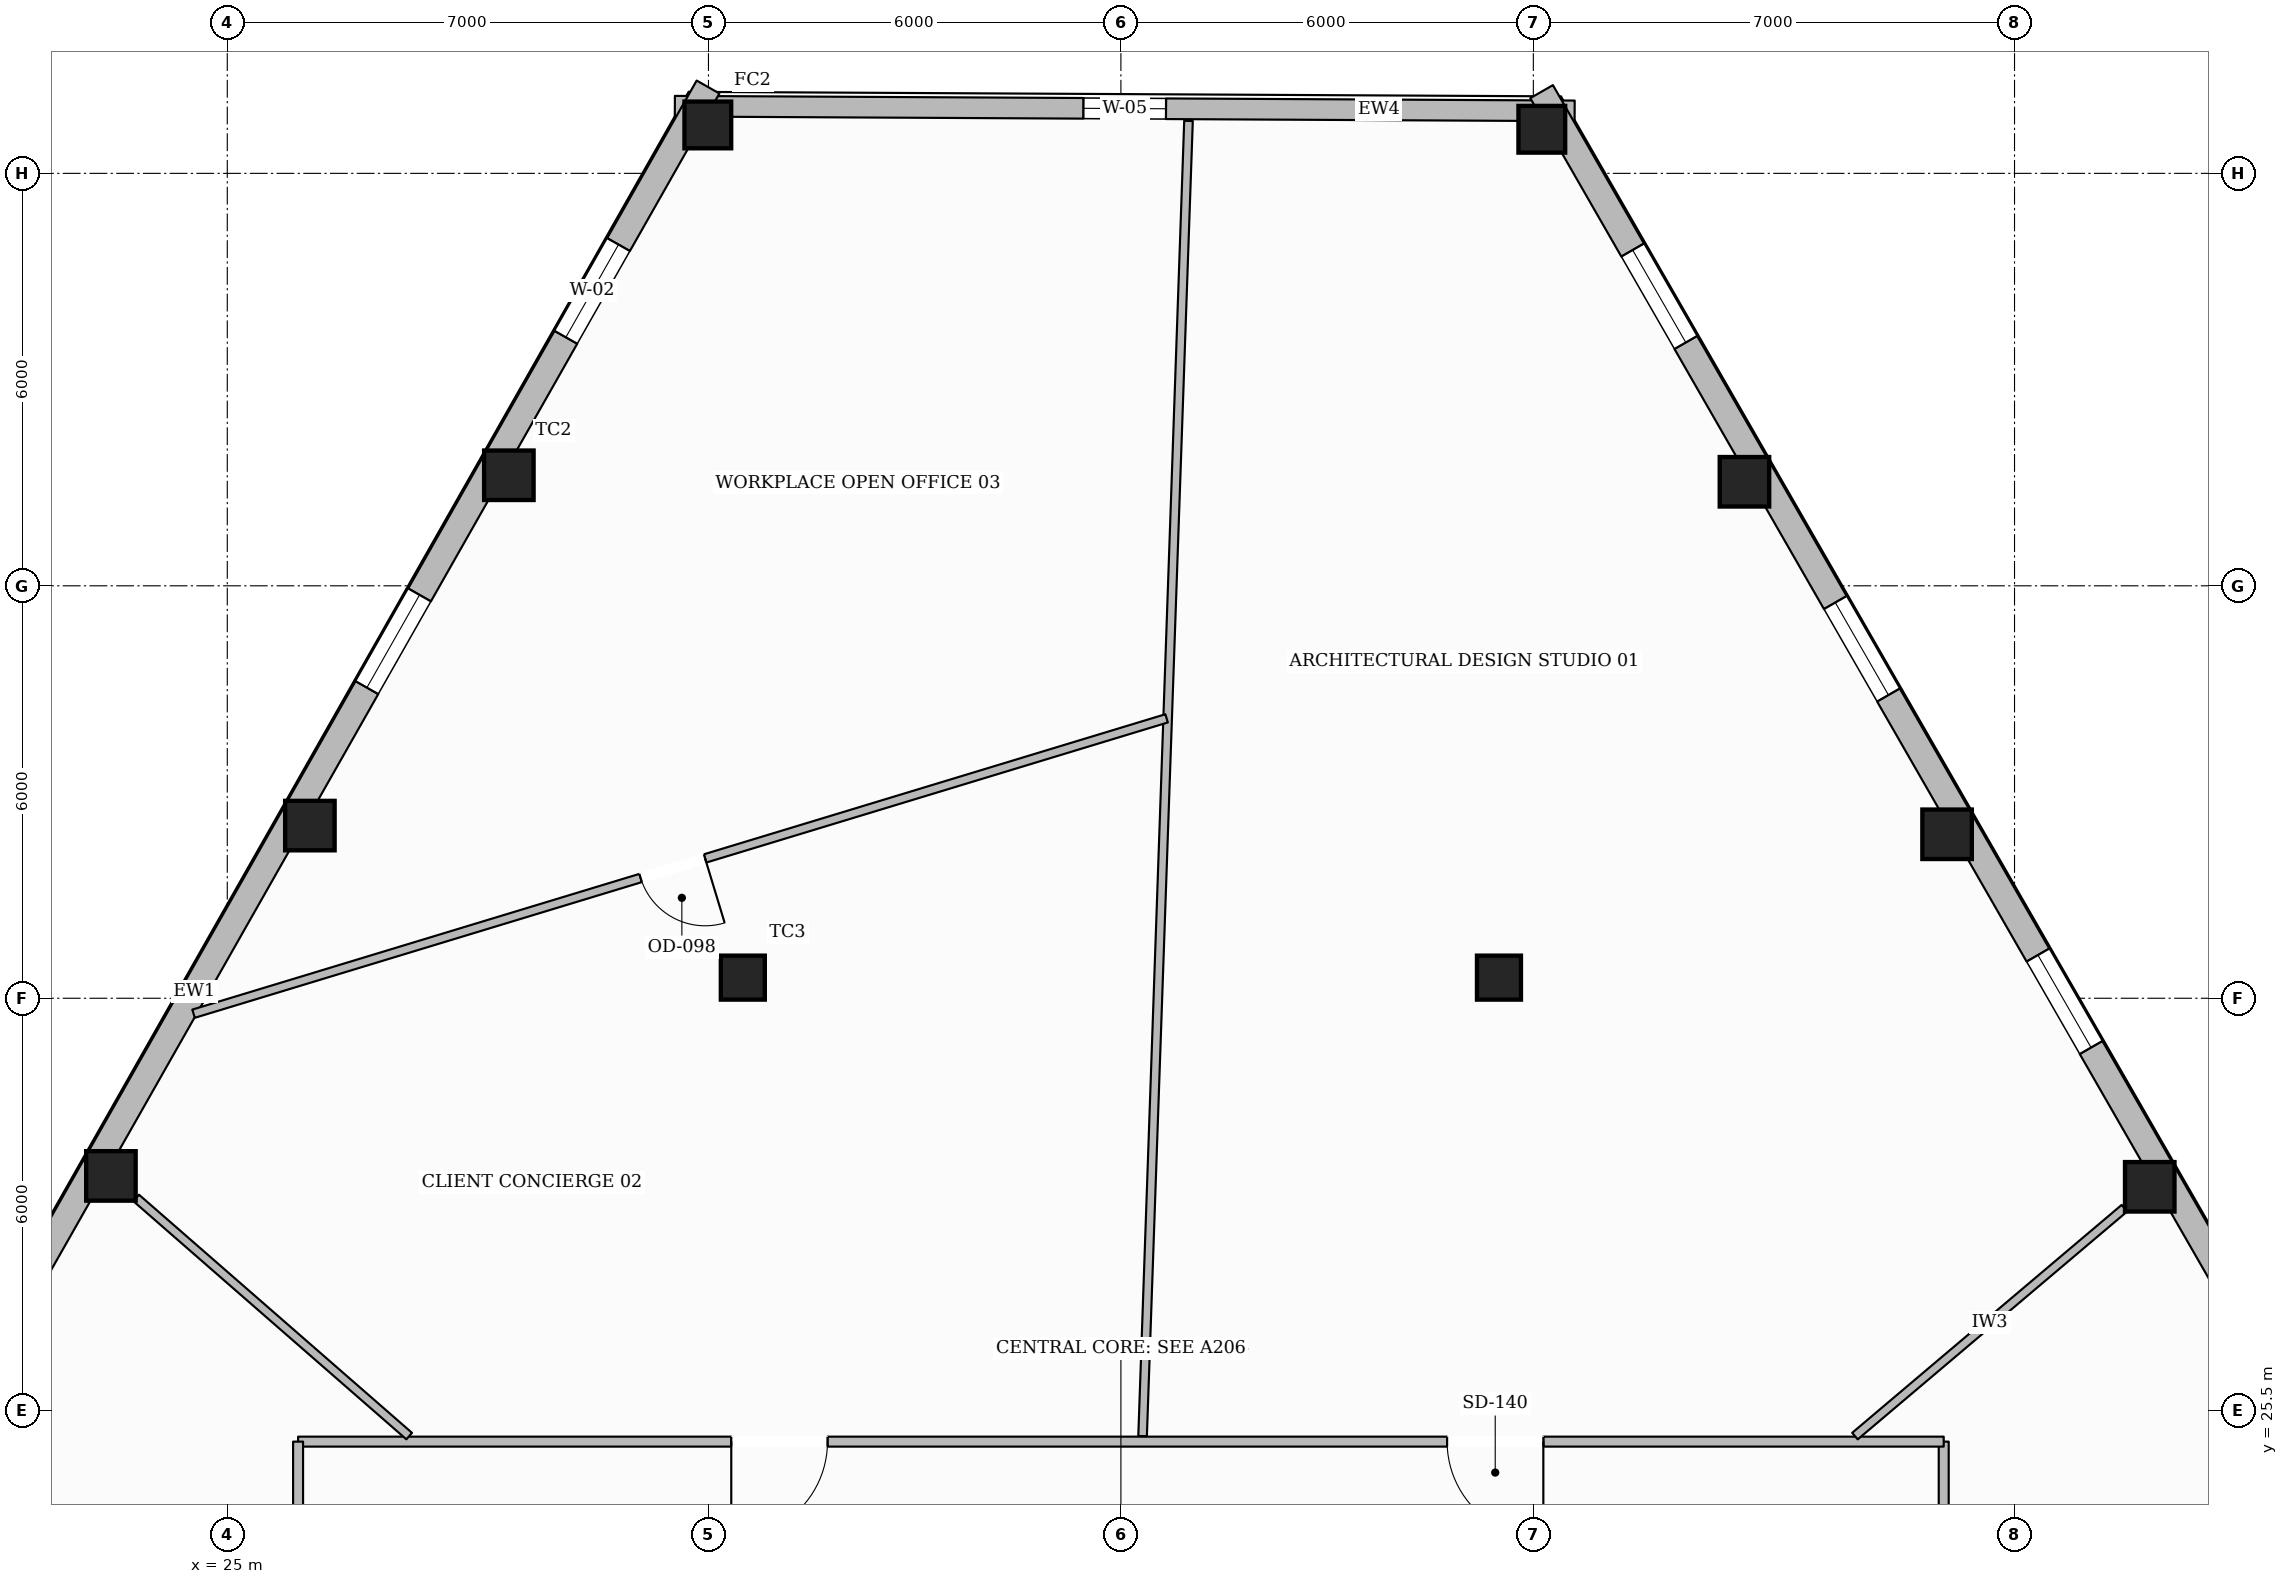
"""IFC4 building model, lengths in metres.
Left out: names, types, materials, properties, quantities, classifications, styles, units other than length and angle.
Written with IfcOpenShell. Run it as: python <this file> out.ifc"""

import sys

from ifc_helpers import new_model, si_unit, direction, frame, frame_2d, origin, origin_2d, place, context, subcontext, project, spatial, rectangle, hollow_rectangle, extrude, element, fill, save


model = new_model("IFC4")
c1 = context("Model", 3, precision=1e-05, world=origin(), true_north=direction((0.0, 1.0)))
c2 = subcontext(c1, "Body", "Model", "MODEL_VIEW")
j1 = project(units=[si_unit("LENGTHUNIT", "METRE"), si_unit("PLANEANGLEUNIT", "RADIAN")], contexts=[c1])
p1 = place(None, origin())
s1 = spatial("IfcSite", under=j1, at=p1, CompositionType="ELEMENT")
p2 = place(p1, origin())
s2 = spatial("IfcBuilding", under=s1, at=p2, CompositionType="ELEMENT")
p3 = place(p2, frame((0.0, 0.0, 100.9)))
s3 = spatial("IfcBuildingStorey", under=s2, at=p3, CompositionType="ELEMENT", Elevation=100.9)
p4 = place(p3, frame((31.991, 44.204, 0.0), z_axis=(0.0, 0.0, 1.0), x_axis=(1.0, 0.0, 0.0)))
e1 = element("IfcColumn", 1, at=p4, inside=s3, PredefinedType="COLUMN", context=c2, shape_type="SweptSolid", body=[
    extrude(hollow_rectangle(XDim=0.68, YDim=0.68, WallThickness=0.03, at=origin_2d()), origin(), (0.0, 0.0, 1.0), 3.6),
])
for number, where, z_axis, x_axis in (
    (2, (29.096, 39.108, 0.0), (0.0, 0.0, 1.0), (1.0, 0.0, 0.0)),
    (3, (26.202, 34.012, 0.0), (0.0, 0.0, 1.0), (1.0, 0.0, 0.0)),
    (4, (23.307, 28.915, 0.0), (0.0, 0.0, 1.0), (1.0, 0.0, 0.0)),
    (5, (52.967, 28.757, 0.0), (0.0, 0.0, 1.0), (1.0, 0.0, 0.0)),
    (6, (50.019, 33.885, 0.0), (0.0, 0.0, 1.0), (1.0, 0.0, 0.0)),
    (7, (47.071, 39.013, 0.0), (0.0, 0.0, 1.0), (1.0, 0.0, 0.0)),
):
    element("IfcColumn", number, at=place(p3, frame(where, z_axis=z_axis, x_axis=x_axis)), inside=s3, PredefinedType="COLUMN", context=c2, shape_type="SweptSolid", body=[
        extrude(hollow_rectangle(XDim=0.72, YDim=0.72, WallThickness=0.032, at=origin_2d()), origin(), (0.0, 0.0, 1.0), 3.6),
    ])
p5 = place(p3, frame((44.123, 44.142, 0.0), z_axis=(0.0, 0.0, 1.0), x_axis=(1.0, 0.0, 0.0)))
e8 = element("IfcColumn", 8, at=p5, inside=s3, PredefinedType="COLUMN", context=c2, shape_type="SweptSolid", body=[
    extrude(hollow_rectangle(XDim=0.68, YDim=0.68, WallThickness=0.03, at=origin_2d()), origin(), (0.0, 0.0, 1.0), 3.6),
])
for number, where, z_axis, x_axis in (
    (9, (32.5, 31.8, 0.0), (0.0, 0.0, 1.0), (1.0, 0.0, 0.0)),
    (10, (43.5, 31.8, 0.0), (0.0, 0.0, 1.0), (1.0, 0.0, 0.0)),
):
    element("IfcColumn", number, at=place(p3, frame(where, z_axis=z_axis, x_axis=x_axis)), inside=s3, PredefinedType="COLUMN", context=c2, shape_type="SweptSolid", body=[
        extrude(hollow_rectangle(XDim=0.64, YDim=0.64, WallThickness=0.028, at=origin_2d()), origin(), (0.0, 0.0, 1.0), 3.6),
    ])
p6 = place(p3, frame((31.511, 44.477, 0.0), z_axis=(0.0, 0.0, 1.0), x_axis=(0.999986654587, -0.005166299301, 0.0)))
e11 = element("IfcWall", 11, at=p6, inside=s3, PredefinedType="STANDARD", context=c2, shape_type="SweptSolid", body=[
    extrude(rectangle(XDim=13.09, YDim=0.3, at=frame_2d((6.545, 0.0))), origin(), (0.0, 0.0, 1.0), 3.059),
])
p7 = place(p6, frame((5.945, 0.0, 0.65)))
e12 = element("IfcOpeningElement", 12, at=p7, cuts=e11, PredefinedType="OPENING", context=c2, shape_type="SweptSolid", body=[
    extrude(rectangle(XDim=1.2, YDim=1.7, at=frame_2d((0.6, 0.85))), frame((0.0, 0.16, 0.0), z_axis=(0.0, -1.0, 0.0), x_axis=(1.0, 0.0, 0.0)), (0.0, 0.0, 1.0), 0.32),
])
p8 = place(p3, frame((14.155, 13.347, 0.0), z_axis=(0.0, 0.0, 1.0), x_axis=(0.493868426836, 0.869536644986, 0.0)))
e13 = element("IfcWall", 13, at=p8, inside=s3, PredefinedType="STANDARD", context=c2, shape_type="SweptSolid", body=[
    extrude(rectangle(XDim=36.121, YDim=0.38, at=frame_2d((18.061, 0.0))), origin(), (0.0, 0.0, 1.0), 3.059),
])
p9 = place(p8, frame((31.935, 0.0, 0.65)))
e14 = element("IfcOpeningElement", 14, at=p9, cuts=e13, PredefinedType="OPENING", context=c2, shape_type="SweptSolid", body=[
    extrude(rectangle(XDim=1.55, YDim=1.75, at=frame_2d((0.775, 0.875))), frame((0.0, 0.2, 0.0), z_axis=(0.0, -1.0, 0.0), x_axis=(1.0, 0.0, 0.0)), (0.0, 0.0, 1.0), 0.4),
])
p10 = place(p8, frame((26.073, 0.0, 0.65)))
e15 = element("IfcOpeningElement", 15, at=p10, cuts=e13, PredefinedType="OPENING", context=c2, shape_type="SweptSolid", body=[
    extrude(rectangle(XDim=1.55, YDim=1.75, at=frame_2d((0.775, 0.875))), frame((0.0, 0.2, 0.0), z_axis=(0.0, -1.0, 0.0), x_axis=(1.0, 0.0, 0.0)), (0.0, 0.0, 1.0), 0.4),
])
p11 = place(p8, frame((14.352, 0.0, 0.65)))
e16 = element("IfcOpeningElement", 16, at=p11, cuts=e13, PredefinedType="OPENING", context=c2, shape_type="SweptSolid", body=[
    extrude(rectangle(XDim=1.55, YDim=1.75, at=frame_2d((0.775, 0.875))), frame((0.0, 0.2, 0.0), z_axis=(0.0, -1.0, 0.0), x_axis=(1.0, 0.0, 0.0)), (0.0, 0.0, 1.0), 0.4),
])
p12 = place(p8, frame((8.491, 0.0, 0.65)))
e17 = element("IfcOpeningElement", 17, at=p12, cuts=e13, PredefinedType="OPENING", context=c2, shape_type="SweptSolid", body=[
    extrude(rectangle(XDim=1.55, YDim=1.75, at=frame_2d((0.775, 0.875))), frame((0.0, 0.2, 0.0), z_axis=(0.0, -1.0, 0.0), x_axis=(1.0, 0.0, 0.0)), (0.0, 0.0, 1.0), 0.4),
])
p13 = place(p8, frame((2.63, 0.0, 0.65)))
e18 = element("IfcOpeningElement", 18, at=p13, cuts=e13, PredefinedType="OPENING", context=c2, shape_type="SweptSolid", body=[
    extrude(rectangle(XDim=1.55, YDim=1.75, at=frame_2d((0.775, 0.875))), frame((0.0, 0.2, 0.0), z_axis=(0.0, -1.0, 0.0), x_axis=(1.0, 0.0, 0.0)), (0.0, 0.0, 1.0), 0.4),
])
p14 = place(p3, frame((44.12, 44.689, 0.0), z_axis=(0.0, 0.0, 1.0), x_axis=(0.498376840975, -0.866960509124, 0.0)))
e19 = element("IfcWall", 19, at=p14, inside=s3, PredefinedType="STANDARD", context=c2, shape_type="SweptSolid", body=[
    extrude(rectangle(XDim=36.441, YDim=0.38, at=frame_2d((18.22, 0.0))), origin(), (0.0, 0.0, 1.0), 3.059),
])
p15 = place(p14, frame((32.234, 0.0, 0.65)))
e20 = element("IfcOpeningElement", 20, at=p15, cuts=e19, PredefinedType="OPENING", context=c2, shape_type="SweptSolid", body=[
    extrude(rectangle(XDim=1.55, YDim=1.75, at=frame_2d((0.775, 0.875))), frame((0.0, 0.2, 0.0), z_axis=(0.0, -1.0, 0.0), x_axis=(1.0, 0.0, 0.0)), (0.0, 0.0, 1.0), 0.4),
])
p16 = place(p14, frame((26.319, 0.0, 0.65)))
e21 = element("IfcOpeningElement", 21, at=p16, cuts=e19, PredefinedType="OPENING", context=c2, shape_type="SweptSolid", body=[
    extrude(rectangle(XDim=1.55, YDim=1.75, at=frame_2d((0.775, 0.875))), frame((0.0, 0.2, 0.0), z_axis=(0.0, -1.0, 0.0), x_axis=(1.0, 0.0, 0.0)), (0.0, 0.0, 1.0), 0.4),
])
p17 = place(p14, frame((14.489, 0.0, 0.65)))
e22 = element("IfcOpeningElement", 22, at=p17, cuts=e19, PredefinedType="OPENING", context=c2, shape_type="SweptSolid", body=[
    extrude(rectangle(XDim=1.55, YDim=1.75, at=frame_2d((0.775, 0.875))), frame((0.0, 0.2, 0.0), z_axis=(0.0, -1.0, 0.0), x_axis=(1.0, 0.0, 0.0)), (0.0, 0.0, 1.0), 0.4),
])
p18 = place(p14, frame((8.573, 0.0, 0.65)))
e23 = element("IfcOpeningElement", 23, at=p18, cuts=e19, PredefinedType="OPENING", context=c2, shape_type="SweptSolid", body=[
    extrude(rectangle(XDim=1.55, YDim=1.75, at=frame_2d((0.775, 0.875))), frame((0.0, 0.2, 0.0), z_axis=(0.0, -1.0, 0.0), x_axis=(1.0, 0.0, 0.0)), (0.0, 0.0, 1.0), 0.4),
])
p19 = place(p14, frame((2.658, 0.0, 0.65)))
e24 = element("IfcOpeningElement", 24, at=p19, cuts=e19, PredefinedType="OPENING", context=c2, shape_type="SweptSolid", body=[
    extrude(rectangle(XDim=1.55, YDim=1.75, at=frame_2d((0.775, 0.875))), frame((0.0, 0.2, 0.0), z_axis=(0.0, -1.0, 0.0), x_axis=(1.0, 0.0, 0.0)), (0.0, 0.0, 1.0), 0.4),
])
p20 = place(p3, frame((49.97, 7.15, 0.0), z_axis=(0.0, 0.0, 1.0), x_axis=(0.0, 1.0, 0.0)))
e25 = element("IfcWall", 25, at=p20, inside=s3, PredefinedType="PARTITIONING", context=c2, shape_type="SweptSolid", body=[
    extrude(rectangle(XDim=17.9, YDim=0.145, at=frame_2d((8.95, 0.0))), origin(), (0.0, 0.0, 1.0), 3.288),
])
p21 = place(p20, frame((8.25, 0.0, 0.0)))
e26 = element("IfcOpeningElement", 26, at=p21, cuts=e25, PredefinedType="OPENING", context=c2, shape_type="SweptSolid", body=[
    extrude(rectangle(XDim=1.4, YDim=2.2, at=frame_2d((0.7, 1.1))), frame((0.0, 0.083, 0.0), z_axis=(0.0, -1.0, 0.0), x_axis=(1.0, 0.0, 0.0)), (0.0, 0.0, 1.0), 0.165),
])
p22 = place(p3, frame((49.97, 25.05, 0.0), z_axis=(0.0, 0.0, 1.0), x_axis=(-1.0, 0.0, 0.0)))
e27 = element("IfcWall", 27, at=p22, inside=s3, PredefinedType="PARTITIONING", context=c2, shape_type="SweptSolid", body=[
    extrude(rectangle(XDim=23.94, YDim=0.145, at=frame_2d((11.97, 0.0))), origin(), (0.0, 0.0, 1.0), 3.6),
])
p23 = place(p22, frame((5.824, 0.0, 0.0)))
e28 = element("IfcOpeningElement", 28, at=p23, cuts=e27, PredefinedType="OPENING", context=c2, shape_type="SweptSolid", body=[
    extrude(rectangle(XDim=1.4, YDim=2.2, at=frame_2d((0.7, 1.1))), frame((0.0, 0.083, 0.0), z_axis=(0.0, -1.0, 0.0), x_axis=(1.0, 0.0, 0.0)), (0.0, 0.0, 1.0), 0.165),
])
p24 = place(p22, frame((16.238, 0.0, 0.0)))
e29 = element("IfcOpeningElement", 29, at=p24, cuts=e27, PredefinedType="OPENING", context=c2, shape_type="SweptSolid", body=[
    extrude(rectangle(XDim=1.4, YDim=2.2, at=frame_2d((0.7, 1.1))), frame((0.0, 0.083, 0.0), z_axis=(0.0, -1.0, 0.0), x_axis=(1.0, 0.0, 0.0)), (0.0, 0.0, 1.0), 0.165),
])
p25 = place(p3, frame((26.03, 25.05, 0.0), z_axis=(0.0, 0.0, 1.0), x_axis=(0.0, -1.0, 0.0)))
e30 = element("IfcWall", 30, at=p25, inside=s3, PredefinedType="PARTITIONING", context=c2, shape_type="SweptSolid", body=[
    extrude(rectangle(XDim=17.9, YDim=0.145, at=frame_2d((8.95, 0.0))), origin(), (0.0, 0.0, 1.0), 3.288),
])
p26 = place(p25, frame((7.016, 0.0, 0.0)))
e31 = element("IfcOpeningElement", 31, at=p26, cuts=e30, PredefinedType="OPENING", context=c2, shape_type="SweptSolid", body=[
    extrude(rectangle(XDim=1.4, YDim=2.2, at=frame_2d((0.7, 1.1))), frame((0.0, 0.083, 0.0), z_axis=(0.0, -1.0, 0.0), x_axis=(1.0, 0.0, 0.0)), (0.0, 0.0, 1.0), 0.165),
])
p27 = place(p3, frame((48.679, 25.131, 0.0), z_axis=(0.0, 0.0, 1.0), x_axis=(0.763563012799, 0.645733323815, 0.0)))
e32 = element("IfcWall", 32, at=p27, inside=s3, PredefinedType="PARTITIONING", context=c2, shape_type="SweptSolid", body=[
    extrude(rectangle(XDim=5.134, YDim=0.125, at=frame_2d((2.567, 0.0))), origin(), (0.0, 0.0, 1.0), 3.141),
])
p28 = place(p3, frame((38.315, 25.131, 0.0), z_axis=(0.0, 0.0, 1.0), x_axis=(0.03489139659, 0.999391109848, 0.0)))
e33 = element("IfcWall", 33, at=p28, inside=s3, PredefinedType="PARTITIONING", context=c2, shape_type="SweptSolid", body=[
    extrude(rectangle(XDim=19.144, YDim=0.125, at=frame_2d((9.572, 0.0))), origin(), (0.0, 0.0, 1.0), 3.6),
])
p29 = place(p3, frame((27.646, 25.131, 0.0), z_axis=(0.0, 0.0, 1.0), x_axis=(-0.753603237889, 0.657329567145, 0.0)))
e34 = element("IfcWall", 34, at=p29, inside=s3, PredefinedType="PARTITIONING", context=c2, shape_type="SweptSolid", body=[
    extrude(rectangle(XDim=5.27, YDim=0.125, at=frame_2d((2.635, 0.0))), origin(), (0.0, 0.0, 1.0), 3.141),
])
p30 = place(p3, frame((38.665, 35.572, 0.0), z_axis=(0.0, 0.0, 1.0), x_axis=(-0.956891470712, -0.290445714856, 0.0)))
e35 = element("IfcWall", 35, at=p30, inside=s3, PredefinedType="PARTITIONING", context=c2, shape_type="SweptSolid", body=[
    extrude(rectangle(XDim=14.793, YDim=0.125, at=frame_2d((7.396, 0.0))), origin(), (0.0, 0.0, 1.0), 3.288),
])
p31 = place(p30, frame((7.016, 0.0, 0.0)))
e36 = element("IfcOpeningElement", 36, at=p31, cuts=e35, PredefinedType="OPENING", context=c2, shape_type="SweptSolid", body=[
    extrude(rectangle(XDim=0.98, YDim=2.15, at=frame_2d((0.49, 1.075))), frame((0.0, 0.073, 0.0), z_axis=(0.0, -1.0, 0.0), x_axis=(1.0, 0.0, 0.0)), (0.0, 0.0, 1.0), 0.145),
])
p32 = place(p9, origin())
e37 = element("IfcWindow", 37, at=p32, inside=s3, PartitioningType="SINGLE_PANEL", PredefinedType="WINDOW", context=c2, shape_type="SweptSolid", body=[
    extrude(rectangle(XDim=1.55, YDim=1.75, at=frame_2d((0.775, 0.875))), frame((0.0, 0.03, 0.0), z_axis=(0.0, -1.0, 0.0), x_axis=(1.0, 0.0, 0.0)), (0.0, 0.0, 1.0), 0.06),
])
fill(e14, e37)
p33 = place(p10, origin())
e38 = element("IfcWindow", 38, at=p33, inside=s3, PartitioningType="SINGLE_PANEL", PredefinedType="WINDOW", context=c2, shape_type="SweptSolid", body=[
    extrude(rectangle(XDim=1.55, YDim=1.75, at=frame_2d((0.775, 0.875))), frame((0.0, 0.03, 0.0), z_axis=(0.0, -1.0, 0.0), x_axis=(1.0, 0.0, 0.0)), (0.0, 0.0, 1.0), 0.06),
])
fill(e15, e38)
p34 = place(p17, origin())
e39 = element("IfcWindow", 39, at=p34, inside=s3, PartitioningType="SINGLE_PANEL", PredefinedType="WINDOW", context=c2, shape_type="SweptSolid", body=[
    extrude(rectangle(XDim=1.55, YDim=1.75, at=frame_2d((0.775, 0.875))), frame((0.0, 0.03, 0.0), z_axis=(0.0, -1.0, 0.0), x_axis=(1.0, 0.0, 0.0)), (0.0, 0.0, 1.0), 0.06),
])
fill(e22, e39)
p35 = place(p18, origin())
e40 = element("IfcWindow", 40, at=p35, inside=s3, PartitioningType="SINGLE_PANEL", PredefinedType="WINDOW", context=c2, shape_type="SweptSolid", body=[
    extrude(rectangle(XDim=1.55, YDim=1.75, at=frame_2d((0.775, 0.875))), frame((0.0, 0.03, 0.0), z_axis=(0.0, -1.0, 0.0), x_axis=(1.0, 0.0, 0.0)), (0.0, 0.0, 1.0), 0.06),
])
fill(e23, e40)
p36 = place(p19, origin())
e41 = element("IfcWindow", 41, at=p36, inside=s3, PartitioningType="SINGLE_PANEL", PredefinedType="WINDOW", context=c2, shape_type="SweptSolid", body=[
    extrude(rectangle(XDim=1.55, YDim=1.75, at=frame_2d((0.775, 0.875))), frame((0.0, 0.03, 0.0), z_axis=(0.0, -1.0, 0.0), x_axis=(1.0, 0.0, 0.0)), (0.0, 0.0, 1.0), 0.06),
])
fill(e24, e41)
p37 = place(p7, origin())
e42 = element("IfcWindow", 42, at=p37, inside=s3, PartitioningType="SINGLE_PANEL", PredefinedType="WINDOW", context=c2, shape_type="SweptSolid", body=[
    extrude(rectangle(XDim=1.2, YDim=1.7, at=frame_2d((0.6, 0.85))), frame((0.0, 0.03, 0.0), z_axis=(0.0, -1.0, 0.0), x_axis=(1.0, 0.0, 0.0)), (0.0, 0.0, 1.0), 0.06),
])
fill(e12, e42)
p38 = place(p23, origin())
e43 = element("IfcDoor", 43, at=p38, inside=s3, OperationType="SINGLE_SWING_LEFT", PredefinedType="DOOR", context=c2, shape_type="SweptSolid", body=[
    extrude(rectangle(XDim=1.4, YDim=2.2, at=frame_2d((0.7, 1.1))), frame((0.0, 0.025, 0.0), z_axis=(0.0, -1.0, 0.0), x_axis=(1.0, 0.0, 0.0)), (0.0, 0.0, 1.0), 0.05),
])
fill(e28, e43)
p39 = place(p24, origin())
e44 = element("IfcDoor", 44, at=p39, inside=s3, OperationType="SINGLE_SWING_RIGHT", PredefinedType="DOOR", context=c2, shape_type="SweptSolid", body=[
    extrude(rectangle(XDim=1.4, YDim=2.2, at=frame_2d((0.7, 1.1))), frame((0.0, 0.025, 0.0), z_axis=(0.0, -1.0, 0.0), x_axis=(1.0, 0.0, 0.0)), (0.0, 0.0, 1.0), 0.05),
])
fill(e29, e44)
p40 = place(p31, origin())
e45 = element("IfcDoor", 45, at=p40, inside=s3, OperationType="SINGLE_SWING_LEFT", PredefinedType="DOOR", context=c2, shape_type="SweptSolid", body=[
    extrude(rectangle(XDim=0.98, YDim=2.15, at=frame_2d((0.49, 1.075))), frame((0.0, 0.025, 0.0), z_axis=(0.0, -1.0, 0.0), x_axis=(1.0, 0.0, 0.0)), (0.0, 0.0, 1.0), 0.05),
])
fill(e36, e45)
save(model, sys.argv[1])
